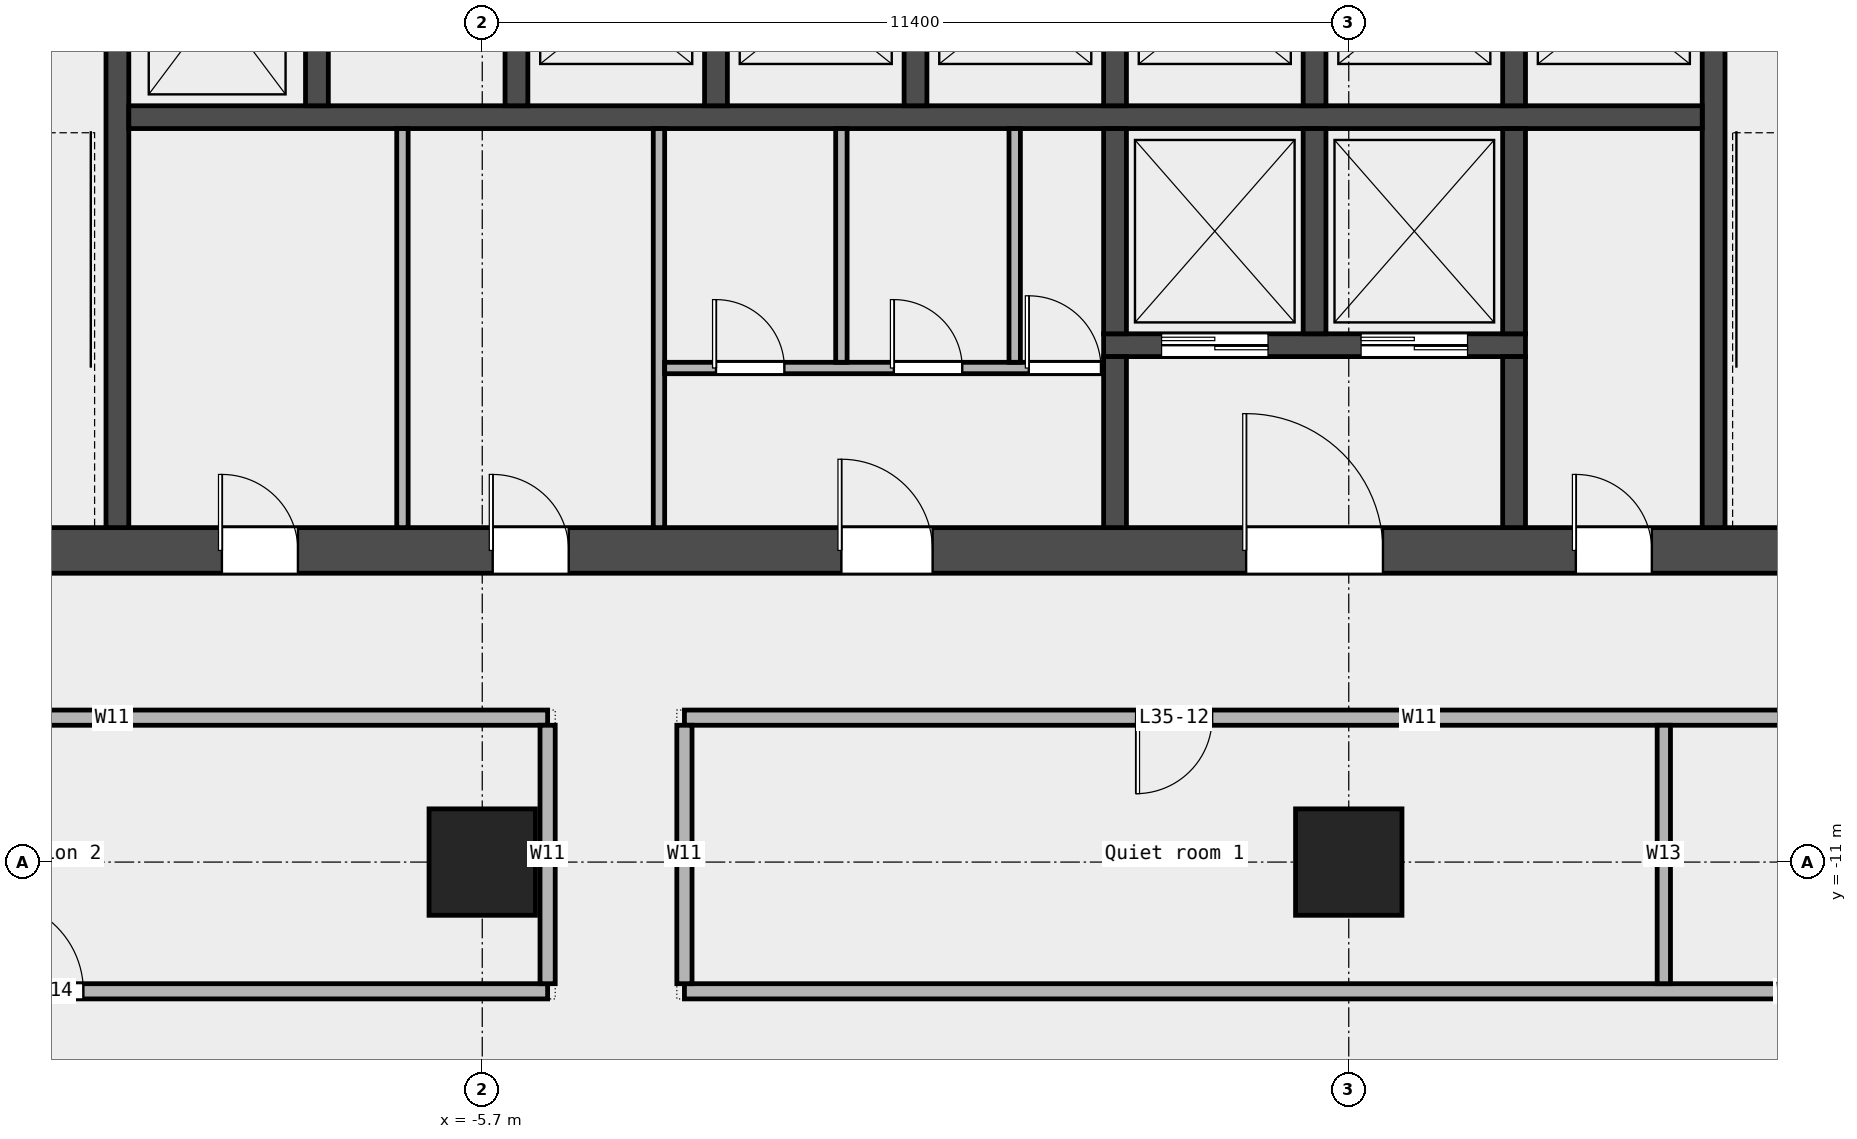
"""IFC4 building model, lengths in metres.
Left out: names, types, materials, properties, quantities, classifications, styles, units other than length and angle.
Written with IfcOpenShell. Run it as: python <this file> out.ifc"""

import sys

from ifc_helpers import new_model, si_unit, direction, frame, frame_2d, origin, origin_2d, place, context, subcontext, project, spatial, rectangle, extrude, element, fill, save


model = new_model("IFC4")
c1 = context("Model", 3, precision=1e-05, world=origin(), true_north=direction((0.0, 1.0)))
c2 = subcontext(c1, "Body", "Model", "MODEL_VIEW")
j1 = project(units=[si_unit("LENGTHUNIT", "METRE"), si_unit("PLANEANGLEUNIT", "RADIAN")], contexts=[c1])
p1 = place(None, origin())
s1 = spatial("IfcSite", under=j1, at=p1, CompositionType="ELEMENT")
p2 = place(p1, origin())
s2 = spatial("IfcBuilding", under=s1, at=p2, CompositionType="ELEMENT")
p3 = place(p2, frame((0.0, 0.0, 173.0)))
s3 = spatial("IfcBuildingStorey", under=s2, at=p3, CompositionType="ELEMENT", Elevation=173.0)
for number, where, z_axis, x_axis in (
    (1, (-5.7, -11.0, 0.0), (0.0, 0.0, 1.0), (1.0, 0.0, 0.0)),
    (2, (5.7, -11.0, 0.0), (0.0, 0.0, 1.0), (1.0, 0.0, 0.0)),
):
    element("IfcColumn", number, at=place(p3, frame(where, z_axis=z_axis, x_axis=x_axis)), inside=s3, PredefinedType="COLUMN", context=c2, shape_type="SweptSolid", body=[
        extrude(rectangle(XDim=1.4, YDim=1.4, at=origin_2d()), origin(), (0.0, 0.0, 1.0), 3.6),
    ])
p4 = place(p3, frame((-26.15, -12.7, 0.0), z_axis=(0.0, 0.0, 1.0), x_axis=(1.0, 0.0, 0.0)))
e3 = element("IfcWall", 3, at=p4, inside=s3, PredefinedType="PARTITIONING", context=c2, shape_type="SweptSolid", body=[
    extrude(rectangle(XDim=21.31, YDim=0.2, at=frame_2d((10.655, 0.0))), origin(), (0.0, 0.0, 1.0), 3.6),
])
p5 = place(p4, frame((3.597, 0.0, 0.0)))
e4 = element("IfcOpeningElement", 4, at=p5, cuts=e3, PredefinedType="OPENING", context=c2, shape_type="SweptSolid", body=[
    extrude(rectangle(XDim=0.9, YDim=2.1, at=frame_2d((0.45, 1.05))), frame((0.0, 0.112, 0.0), z_axis=(0.0, -1.0, 0.0), x_axis=(1.0, 0.0, 0.0)), (0.0, 0.0, 1.0), 0.224),
])
p6 = place(p4, frame((14.002, 0.0, 0.0)))
e5 = element("IfcOpeningElement", 5, at=p6, cuts=e3, PredefinedType="OPENING", context=c2, shape_type="SweptSolid", body=[
    extrude(rectangle(XDim=1.2, YDim=2.1, at=frame_2d((0.6, 1.05))), frame((0.0, 0.112, 0.0), z_axis=(0.0, -1.0, 0.0), x_axis=(1.0, 0.0, 0.0)), (0.0, 0.0, 1.0), 0.224),
])
p7 = place(p3, frame((-3.04, -12.7, 0.0), z_axis=(0.0, 0.0, 1.0), x_axis=(1.0, 0.0, 0.0)))
e6 = element("IfcWall", 6, at=p7, inside=s3, PredefinedType="PARTITIONING", context=c2, shape_type="SweptSolid", body=[
    extrude(rectangle(XDim=29.19, YDim=0.2, at=frame_2d((14.595, 0.0))), origin(), (0.0, 0.0, 1.0), 3.6),
])
p8 = place(p7, frame((20.938, 0.0, 0.0)))
e7 = element("IfcOpeningElement", 7, at=p8, cuts=e6, PredefinedType="OPENING", context=c2, shape_type="SweptSolid", body=[
    extrude(rectangle(XDim=1.2, YDim=2.1, at=frame_2d((0.6, 1.05))), frame((0.0, 0.112, 0.0), z_axis=(0.0, -1.0, 0.0), x_axis=(1.0, 0.0, 0.0)), (0.0, 0.0, 1.0), 0.224),
])
p9 = place(p3, frame((-16.3, -9.1, 0.0), z_axis=(0.0, 0.0, 1.0), x_axis=(1.0, 0.0, 0.0)))
e8 = element("IfcWall", 8, at=p9, inside=s3, PredefinedType="PARTITIONING", context=c2, shape_type="SweptSolid", body=[
    extrude(rectangle(XDim=11.46, YDim=0.2, at=frame_2d((5.73, 0.0))), origin(), (0.0, 0.0, 1.0), 3.6),
])
p10 = place(p3, frame((-3.04, -9.1, 0.0), z_axis=(0.0, 0.0, 1.0), x_axis=(1.0, 0.0, 0.0)))
e9 = element("IfcWall", 9, at=p10, inside=s3, PredefinedType="PARTITIONING", context=c2, shape_type="SweptSolid", body=[
    extrude(rectangle(XDim=19.34, YDim=0.2, at=frame_2d((9.67, 0.0))), origin(), (0.0, 0.0, 1.0), 3.6),
])
p11 = place(p10, frame((5.942, 0.0, 0.0)))
e10 = element("IfcOpeningElement", 10, at=p11, cuts=e9, PredefinedType="OPENING", context=c2, shape_type="SweptSolid", body=[
    extrude(rectangle(XDim=1.0, YDim=2.1, at=frame_2d((0.5, 1.05))), frame((0.0, 0.112, 0.0), z_axis=(0.0, -1.0, 0.0), x_axis=(1.0, 0.0, 0.0)), (0.0, 0.0, 1.0), 0.224),
])
for number, where, z_axis, x_axis in (
    (11, (-4.84, -12.6, 0.0), (0.0, 0.0, 1.0), (0.0, 1.0, 0.0)),
    (12, (-3.04, -12.6, 0.0), (0.0, 0.0, 1.0), (0.0, 1.0, 0.0)),
):
    element("IfcWall", number, at=place(p3, frame(where, z_axis=z_axis, x_axis=x_axis)), inside=s3, PredefinedType="PARTITIONING", context=c2, shape_type="SweptSolid", body=[
        extrude(rectangle(XDim=3.4, YDim=0.2, at=frame_2d((1.7, 0.0))), origin(), (0.0, 0.0, 1.0), 3.6),
    ])
p12 = place(p3, frame((9.845, -12.6, 0.0), z_axis=(0.0, 0.0, 1.0), x_axis=(0.0, 1.0, 0.0)))
e13 = element("IfcWall", 13, at=p12, inside=s3, PredefinedType="PARTITIONING", context=c2, shape_type="SweptSolid", body=[
    extrude(rectangle(XDim=3.4, YDim=0.175, at=frame_2d((1.7, 0.0))), origin(), (0.0, 0.0, 1.0), 3.6),
])
p13 = place(p3, frame((-14.4, -6.9, 0.0), z_axis=(0.0, 0.0, 1.0), x_axis=(1.0, 0.0, 0.0)))
e14 = element("IfcWall", 14, at=p13, inside=s3, PredefinedType="SHEAR", context=c2, shape_type="SweptSolid", body=[
    extrude(rectangle(XDim=28.8, YDim=0.6, at=frame_2d((14.4, 0.0))), origin(), (0.0, 0.0, 1.0), 3.7),
])
p14 = place(p13, frame((5.275, 0.0, 0.0)))
e15 = element("IfcOpeningElement", 15, at=p14, cuts=e14, PredefinedType="OPENING", context=c2, shape_type="SweptSolid", body=[
    extrude(rectangle(XDim=1.0, YDim=2.1, at=frame_2d((0.5, 1.05))), frame((0.0, 0.312, 0.0), z_axis=(0.0, -1.0, 0.0), x_axis=(1.0, 0.0, 0.0)), (0.0, 0.0, 1.0), 0.624),
])
p15 = place(p13, frame((8.837, 0.0, 0.0)))
e16 = element("IfcOpeningElement", 16, at=p15, cuts=e14, PredefinedType="OPENING", context=c2, shape_type="SweptSolid", body=[
    extrude(rectangle(XDim=1.0, YDim=2.1, at=frame_2d((0.5, 1.05))), frame((0.0, 0.312, 0.0), z_axis=(0.0, -1.0, 0.0), x_axis=(1.0, 0.0, 0.0)), (0.0, 0.0, 1.0), 0.624),
])
p16 = place(p13, frame((13.425, 0.0, 0.0)))
e17 = element("IfcOpeningElement", 17, at=p16, cuts=e14, PredefinedType="OPENING", context=c2, shape_type="SweptSolid", body=[
    extrude(rectangle(XDim=1.2, YDim=2.1, at=frame_2d((0.6, 1.05))), frame((0.0, 0.312, 0.0), z_axis=(0.0, -1.0, 0.0), x_axis=(1.0, 0.0, 0.0)), (0.0, 0.0, 1.0), 0.624),
])
p17 = place(p13, frame((18.75, 0.0, 0.0)))
e18 = element("IfcOpeningElement", 18, at=p17, cuts=e14, PredefinedType="OPENING", context=c2, shape_type="SweptSolid", body=[
    extrude(rectangle(XDim=1.8, YDim=2.1, at=frame_2d((0.9, 1.05))), frame((0.0, 0.312, 0.0), z_axis=(0.0, -1.0, 0.0), x_axis=(1.0, 0.0, 0.0)), (0.0, 0.0, 1.0), 0.624),
])
p18 = place(p13, frame((23.087, 0.0, 0.0)))
e19 = element("IfcOpeningElement", 19, at=p18, cuts=e14, PredefinedType="OPENING", context=c2, shape_type="SweptSolid", body=[
    extrude(rectangle(XDim=1.0, YDim=2.1, at=frame_2d((0.5, 1.05))), frame((0.0, 0.312, 0.0), z_axis=(0.0, -1.0, 0.0), x_axis=(1.0, 0.0, 0.0)), (0.0, 0.0, 1.0), 0.624),
])
for number, where, z_axis, x_axis in (
    (20, (-10.5, -6.6, 0.0), (0.0, 0.0, 1.0), (0.0, 1.0, 0.0)),
    (21, (10.5, -6.6, 0.0), (0.0, 0.0, 1.0), (0.0, 1.0, 0.0)),
):
    element("IfcWall", number, at=place(p3, frame(where, z_axis=z_axis, x_axis=x_axis)), inside=s3, PredefinedType="SHEAR", context=c2, shape_type="SweptSolid", body=[
        extrude(rectangle(XDim=8.55, YDim=0.3, at=frame_2d((4.275, 0.0))), origin(), (0.0, 0.0, 1.0), 3.7),
    ])
p19 = place(p3, frame((-10.35, -1.2, 0.0), z_axis=(0.0, 0.0, 1.0), x_axis=(1.0, 0.0, 0.0)))
e22 = element("IfcWall", 22, at=p19, inside=s3, PredefinedType="SOLIDWALL", context=c2, shape_type="SweptSolid", body=[
    extrude(rectangle(XDim=20.7, YDim=0.3, at=frame_2d((10.35, 0.0))), origin(), (0.0, 0.0, 1.0), 3.7),
])
for number, where, z_axis, x_axis in (
    (23, (-7.875, -1.05, 0.0), (0.0, 0.0, 1.0), (0.0, 1.0, 0.0)),
    (24, (-5.25, -1.05, 0.0), (0.0, 0.0, 1.0), (0.0, 1.0, 0.0)),
    (25, (-2.625, -1.05, 0.0), (0.0, 0.0, 1.0), (0.0, 1.0, 0.0)),
    (26, (0.0, -1.05, 0.0), (0.0, 0.0, 1.0), (0.0, 1.0, 0.0)),
    (27, (2.625, -1.05, 0.0), (0.0, 0.0, 1.0), (0.0, 1.0, 0.0)),
    (28, (5.25, -1.05, 0.0), (0.0, 0.0, 1.0), (0.0, 1.0, 0.0)),
    (29, (7.875, -1.05, 0.0), (0.0, 0.0, 1.0), (0.0, 1.0, 0.0)),
):
    element("IfcWall", number, at=place(p3, frame(where, z_axis=z_axis, x_axis=x_axis)), inside=s3, PredefinedType="SOLIDWALL", context=c2, shape_type="SweptSolid", body=[
        extrude(rectangle(XDim=2.7, YDim=0.3, at=frame_2d((1.35, 0.0))), origin(), (0.0, 0.0, 1.0), 3.7),
    ])
p20 = place(p3, frame((2.475, -4.2, 0.0), z_axis=(0.0, 0.0, 1.0), x_axis=(1.0, 0.0, 0.0)))
e30 = element("IfcWall", 30, at=p20, inside=s3, PredefinedType="SOLIDWALL", context=c2, shape_type="SweptSolid", body=[
    extrude(rectangle(XDim=5.55, YDim=0.3, at=frame_2d((2.775, 0.0))), origin(), (0.0, 0.0, 1.0), 3.7),
])
p21 = place(p20, frame((0.762, 0.0, 0.0)))
e31 = element("IfcOpeningElement", 31, at=p21, cuts=e30, PredefinedType="OPENING", context=c2, shape_type="SweptSolid", body=[
    extrude(rectangle(XDim=1.4, YDim=2.1, at=frame_2d((0.7, 1.05))), frame((0.0, 0.162, 0.0), z_axis=(0.0, -1.0, 0.0), x_axis=(1.0, 0.0, 0.0)), (0.0, 0.0, 1.0), 0.324),
])
p22 = place(p20, frame((3.387, 0.0, 0.0)))
e32 = element("IfcOpeningElement", 32, at=p22, cuts=e30, PredefinedType="OPENING", context=c2, shape_type="SweptSolid", body=[
    extrude(rectangle(XDim=1.4, YDim=2.1, at=frame_2d((0.7, 1.05))), frame((0.0, 0.162, 0.0), z_axis=(0.0, -1.0, 0.0), x_axis=(1.0, 0.0, 0.0)), (0.0, 0.0, 1.0), 0.324),
])
p23 = place(p3, frame((2.625, -4.05, 0.0), z_axis=(0.0, 0.0, 1.0), x_axis=(0.0, 1.0, 0.0)))
e33 = element("IfcWall", 33, at=p23, inside=s3, PredefinedType="SOLIDWALL", context=c2, shape_type="SweptSolid", body=[
    extrude(rectangle(XDim=2.7, YDim=0.3, at=frame_2d((1.35, 0.0))), origin(), (0.0, 0.0, 1.0), 3.7),
])
p24 = place(p3, frame((2.625, -6.6, 0.0), z_axis=(0.0, 0.0, 1.0), x_axis=(0.0, 1.0, 0.0)))
e34 = element("IfcWall", 34, at=p24, inside=s3, PredefinedType="SOLIDWALL", context=c2, shape_type="SweptSolid", body=[
    extrude(rectangle(XDim=2.25, YDim=0.3, at=frame_2d((1.125, 0.0))), origin(), (0.0, 0.0, 1.0), 3.7),
])
for number, where, z_axis, x_axis in (
    (35, (5.25, -4.05, 0.0), (0.0, 0.0, 1.0), (0.0, 1.0, 0.0)),
    (36, (7.875, -4.05, 0.0), (0.0, 0.0, 1.0), (0.0, 1.0, 0.0)),
):
    element("IfcWall", number, at=place(p3, frame(where, z_axis=z_axis, x_axis=x_axis)), inside=s3, PredefinedType="SOLIDWALL", context=c2, shape_type="SweptSolid", body=[
        extrude(rectangle(XDim=2.7, YDim=0.3, at=frame_2d((1.35, 0.0))), origin(), (0.0, 0.0, 1.0), 3.7),
    ])
p25 = place(p3, frame((7.875, -6.6, 0.0), z_axis=(0.0, 0.0, 1.0), x_axis=(0.0, 1.0, 0.0)))
e37 = element("IfcWall", 37, at=p25, inside=s3, PredefinedType="SOLIDWALL", context=c2, shape_type="SweptSolid", body=[
    extrude(rectangle(XDim=2.25, YDim=0.3, at=frame_2d((1.125, 0.0))), origin(), (0.0, 0.0, 1.0), 3.7),
])
for number, where, z_axis, x_axis in (
    (38, (-6.75, -6.6, 0.0), (0.0, 0.0, 1.0), (0.0, 1.0, 0.0)),
    (39, (-3.375, -6.6, 0.0), (0.0, 0.0, 1.0), (0.0, 1.0, 0.0)),
):
    element("IfcWall", number, at=place(p3, frame(where, z_axis=z_axis, x_axis=x_axis)), inside=s3, PredefinedType="PARTITIONING", context=c2, shape_type="SweptSolid", body=[
        extrude(rectangle(XDim=5.25, YDim=0.15, at=frame_2d((2.625, 0.0))), origin(), (0.0, 0.0, 1.0), 3.7),
    ])
p26 = place(p3, frame((-3.3, -4.5, 0.0), z_axis=(0.0, 0.0, 1.0), x_axis=(1.0, 0.0, 0.0)))
e40 = element("IfcWall", 40, at=p26, inside=s3, PredefinedType="PARTITIONING", context=c2, shape_type="SweptSolid", body=[
    extrude(rectangle(XDim=5.775, YDim=0.15, at=frame_2d((2.888, 0.0))), origin(), (0.0, 0.0, 1.0), 3.7),
])
p27 = place(p26, frame((0.675, 0.0, 0.0)))
e41 = element("IfcOpeningElement", 41, at=p27, cuts=e40, PredefinedType="OPENING", context=c2, shape_type="SweptSolid", body=[
    extrude(rectangle(XDim=0.9, YDim=2.1, at=frame_2d((0.45, 1.05))), frame((0.0, 0.087, 0.0), z_axis=(0.0, -1.0, 0.0), x_axis=(1.0, 0.0, 0.0)), (0.0, 0.0, 1.0), 0.174),
])
p28 = place(p26, frame((3.015, 0.0, 0.0)))
e42 = element("IfcOpeningElement", 42, at=p28, cuts=e40, PredefinedType="OPENING", context=c2, shape_type="SweptSolid", body=[
    extrude(rectangle(XDim=0.9, YDim=2.1, at=frame_2d((0.45, 1.05))), frame((0.0, 0.087, 0.0), z_axis=(0.0, -1.0, 0.0), x_axis=(1.0, 0.0, 0.0)), (0.0, 0.0, 1.0), 0.174),
])
p29 = place(p26, frame((4.79, 0.0, 0.0)))
e43 = element("IfcOpeningElement", 43, at=p29, cuts=e40, PredefinedType="OPENING", context=c2, shape_type="SweptSolid", body=[
    extrude(rectangle(XDim=0.95, YDim=2.1, at=frame_2d((0.475, 1.05))), frame((0.0, 0.087, 0.0), z_axis=(0.0, -1.0, 0.0), x_axis=(1.0, 0.0, 0.0)), (0.0, 0.0, 1.0), 0.174),
])
for number, where, z_axis, x_axis in (
    (44, (-0.975, -4.425, 0.0), (0.0, 0.0, 1.0), (0.0, 1.0, 0.0)),
    (45, (1.305, -4.425, 0.0), (0.0, 0.0, 1.0), (0.0, 1.0, 0.0)),
):
    element("IfcWall", number, at=place(p3, frame(where, z_axis=z_axis, x_axis=x_axis)), inside=s3, PredefinedType="PARTITIONING", context=c2, shape_type="SweptSolid", body=[
        extrude(rectangle(XDim=3.075, YDim=0.15, at=frame_2d((1.538, 0.0))), origin(), (0.0, 0.0, 1.0), 3.7),
    ])
p30 = place(p11, origin())
e46 = element("IfcDoor", 46, at=p30, inside=s3, OperationType="SINGLE_SWING_RIGHT", PredefinedType="DOOR", context=c2, shape_type="SweptSolid", body=[
    extrude(rectangle(XDim=1.0, YDim=2.1, at=frame_2d((0.5, 1.05))), frame((0.0, 0.025, 0.0), z_axis=(0.0, -1.0, 0.0), x_axis=(1.0, 0.0, 0.0)), (0.0, 0.0, 1.0), 0.05),
])
fill(e10, e46)
p31 = place(p6, origin())
e47 = element("IfcDoor", 47, at=p31, inside=s3, OperationType="SINGLE_SWING_LEFT", PredefinedType="DOOR", context=c2, shape_type="SweptSolid", body=[
    extrude(rectangle(XDim=1.2, YDim=2.1, at=frame_2d((0.6, 1.05))), frame((0.0, 0.025, 0.0), z_axis=(0.0, -1.0, 0.0), x_axis=(1.0, 0.0, 0.0)), (0.0, 0.0, 1.0), 0.05),
])
fill(e5, e47)
p32 = place(p21, origin())
e48 = element("IfcDoor", 48, at=p32, inside=s3, OperationType="DOUBLE_DOOR_SLIDING", PredefinedType="DOOR", context=c2, shape_type="SweptSolid", body=[
    extrude(rectangle(XDim=1.4, YDim=2.1, at=frame_2d((0.7, 1.05))), frame((0.0, 0.025, 0.0), z_axis=(0.0, -1.0, 0.0), x_axis=(1.0, 0.0, 0.0)), (0.0, 0.0, 1.0), 0.05),
])
fill(e31, e48)
p33 = place(p22, origin())
e49 = element("IfcDoor", 49, at=p33, inside=s3, OperationType="DOUBLE_DOOR_SLIDING", PredefinedType="DOOR", context=c2, shape_type="SweptSolid", body=[
    extrude(rectangle(XDim=1.4, YDim=2.1, at=frame_2d((0.7, 1.05))), frame((0.0, 0.025, 0.0), z_axis=(0.0, -1.0, 0.0), x_axis=(1.0, 0.0, 0.0)), (0.0, 0.0, 1.0), 0.05),
])
fill(e32, e49)
p34 = place(p14, origin())
e50 = element("IfcDoor", 50, at=p34, inside=s3, OperationType="SINGLE_SWING_LEFT", PredefinedType="DOOR", context=c2, shape_type="SweptSolid", body=[
    extrude(rectangle(XDim=1.0, YDim=2.1, at=frame_2d((0.5, 1.05))), frame((0.0, 0.025, 0.0), z_axis=(0.0, -1.0, 0.0), x_axis=(1.0, 0.0, 0.0)), (0.0, 0.0, 1.0), 0.05),
])
fill(e15, e50)
p35 = place(p15, origin())
e51 = element("IfcDoor", 51, at=p35, inside=s3, OperationType="SINGLE_SWING_LEFT", PredefinedType="DOOR", context=c2, shape_type="SweptSolid", body=[
    extrude(rectangle(XDim=1.0, YDim=2.1, at=frame_2d((0.5, 1.05))), frame((0.0, 0.025, 0.0), z_axis=(0.0, -1.0, 0.0), x_axis=(1.0, 0.0, 0.0)), (0.0, 0.0, 1.0), 0.05),
])
fill(e16, e51)
p36 = place(p16, origin())
e52 = element("IfcDoor", 52, at=p36, inside=s3, OperationType="SINGLE_SWING_LEFT", PredefinedType="DOOR", context=c2, shape_type="SweptSolid", body=[
    extrude(rectangle(XDim=1.2, YDim=2.1, at=frame_2d((0.6, 1.05))), frame((0.0, 0.025, 0.0), z_axis=(0.0, -1.0, 0.0), x_axis=(1.0, 0.0, 0.0)), (0.0, 0.0, 1.0), 0.05),
])
fill(e17, e52)
p37 = place(p27, origin())
e53 = element("IfcDoor", 53, at=p37, inside=s3, OperationType="SINGLE_SWING_LEFT", PredefinedType="DOOR", context=c2, shape_type="SweptSolid", body=[
    extrude(rectangle(XDim=0.9, YDim=2.1, at=frame_2d((0.45, 1.05))), frame((0.0, 0.025, 0.0), z_axis=(0.0, -1.0, 0.0), x_axis=(1.0, 0.0, 0.0)), (0.0, 0.0, 1.0), 0.05),
])
fill(e41, e53)
p38 = place(p28, origin())
e54 = element("IfcDoor", 54, at=p38, inside=s3, OperationType="SINGLE_SWING_LEFT", PredefinedType="DOOR", context=c2, shape_type="SweptSolid", body=[
    extrude(rectangle(XDim=0.9, YDim=2.1, at=frame_2d((0.45, 1.05))), frame((0.0, 0.025, 0.0), z_axis=(0.0, -1.0, 0.0), x_axis=(1.0, 0.0, 0.0)), (0.0, 0.0, 1.0), 0.05),
])
fill(e42, e54)
p39 = place(p29, origin())
e55 = element("IfcDoor", 55, at=p39, inside=s3, OperationType="SINGLE_SWING_LEFT", PredefinedType="DOOR", context=c2, shape_type="SweptSolid", body=[
    extrude(rectangle(XDim=0.95, YDim=2.1, at=frame_2d((0.475, 1.05))), frame((0.0, 0.025, 0.0), z_axis=(0.0, -1.0, 0.0), x_axis=(1.0, 0.0, 0.0)), (0.0, 0.0, 1.0), 0.05),
])
fill(e43, e55)
p40 = place(p17, origin())
e56 = element("IfcDoor", 56, at=p40, inside=s3, OperationType="DOUBLE_DOOR_SINGLE_SWING", PredefinedType="DOOR", context=c2, shape_type="SweptSolid", body=[
    extrude(rectangle(XDim=1.8, YDim=2.1, at=frame_2d((0.9, 1.05))), frame((0.0, 0.025, 0.0), z_axis=(0.0, -1.0, 0.0), x_axis=(1.0, 0.0, 0.0)), (0.0, 0.0, 1.0), 0.05),
])
fill(e18, e56)
p41 = place(p18, origin())
e57 = element("IfcDoor", 57, at=p41, inside=s3, OperationType="SINGLE_SWING_LEFT", PredefinedType="DOOR", context=c2, shape_type="SweptSolid", body=[
    extrude(rectangle(XDim=1.0, YDim=2.1, at=frame_2d((0.5, 1.05))), frame((0.0, 0.025, 0.0), z_axis=(0.0, -1.0, 0.0), x_axis=(1.0, 0.0, 0.0)), (0.0, 0.0, 1.0), 0.05),
])
fill(e19, e57)
save(model, sys.argv[1])
